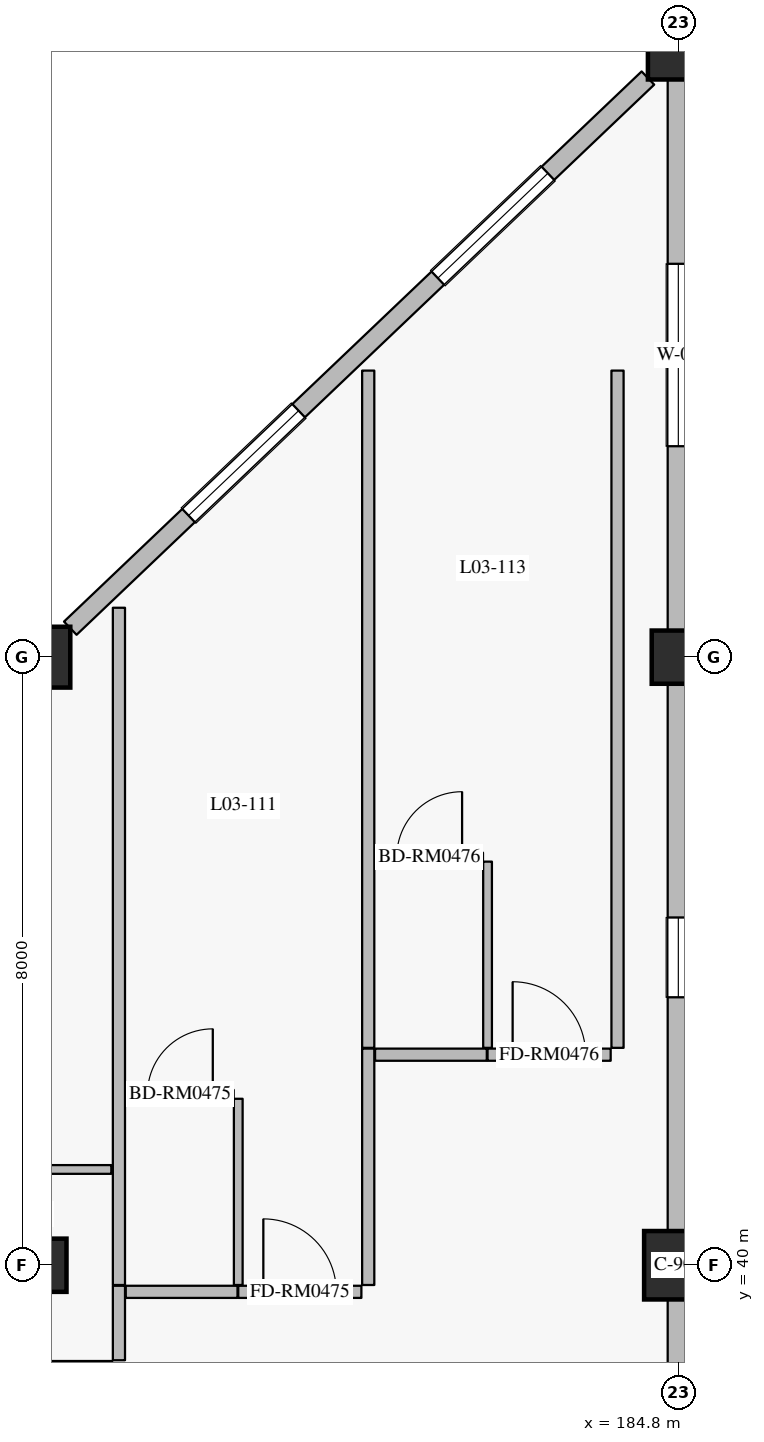
"""IFC4 building model, lengths in metres.
Left out: names, types, materials, properties, quantities, classifications, styles, units other than length and angle.
Written with IfcOpenShell. Run it as: python <this file> out.ifc"""

import sys

from ifc_helpers import new_model, si_unit, direction, frame, frame_2d, origin, origin_2d, place, context, subcontext, project, spatial, rectangle, extrude, element, fill, save


model = new_model("IFC4")
c1 = context("Model", 3, precision=1e-05, world=origin(), true_north=direction((0.0, 1.0)))
c2 = subcontext(c1, "Body", "Model", "MODEL_VIEW")
j1 = project(units=[si_unit("LENGTHUNIT", "METRE"), si_unit("PLANEANGLEUNIT", "RADIAN")], contexts=[c1])
p1 = place(None, origin())
s1 = spatial("IfcSite", under=j1, at=p1, CompositionType="ELEMENT")
p2 = place(p1, origin())
s2 = spatial("IfcBuilding", under=s1, at=p2, CompositionType="ELEMENT")
p3 = place(p2, frame((0.0, 0.0, 16.2)))
s3 = spatial("IfcBuildingStorey", under=s2, at=p3, CompositionType="ELEMENT", Elevation=16.2)
p4 = place(p3, frame((176.4, 48.0, 0.0), z_axis=(0.0, 0.0, 1.0), x_axis=(1.0, 0.0, 0.0)))
e1 = element("IfcColumn", 1, at=p4, inside=s3, PredefinedType="COLUMN", context=c2, shape_type="SweptSolid", body=[
    extrude(rectangle(XDim=0.8, YDim=0.8, at=origin_2d()), origin(), (0.0, 0.0, 1.0), 4.8),
])
p5 = place(p3, frame((184.8, 40.0, 0.0), z_axis=(0.0, 0.0, 1.0), x_axis=(1.0, 0.0, 0.0)))
e2 = element("IfcColumn", 2, at=p5, inside=s3, PredefinedType="COLUMN", context=c2, shape_type="SweptSolid", body=[
    extrude(rectangle(XDim=0.9, YDim=0.9, at=origin_2d()), origin(), (0.0, 0.0, 1.0), 4.8),
])
p6 = place(p3, frame((184.8, 56.0, 0.0), z_axis=(0.0, 0.0, 1.0), x_axis=(1.0, 0.0, 0.0)))
e3 = element("IfcColumn", 3, at=p6, inside=s3, PredefinedType="COLUMN", context=c2, shape_type="SweptSolid", body=[
    extrude(rectangle(XDim=0.8, YDim=0.8, at=origin_2d()), origin(), (0.0, 0.0, 1.0), 4.8),
])
for number, where, z_axis, x_axis in (
    (4, (176.4, 40.0, 0.0), (0.0, 0.0, 1.0), (1.0, 0.0, 0.0)),
    (5, (184.8, 48.0, 0.0), (0.0, 0.0, 1.0), (1.0, 0.0, 0.0)),
):
    element("IfcColumn", number, at=place(p3, frame(where, z_axis=z_axis, x_axis=x_axis)), inside=s3, PredefinedType="COLUMN", context=c2, shape_type="SweptSolid", body=[
        extrude(rectangle(XDim=0.7, YDim=0.7, at=origin_2d()), origin(), (0.0, 0.0, 1.0), 4.8),
    ])
p7 = place(p3, frame((176.8, 48.381, 0.0), z_axis=(0.0, 0.0, 1.0), x_axis=(0.724145676014, 0.689647040094, 0.0)))
e6 = element("IfcWall", 6, at=p7, inside=s3, PredefinedType="SOLIDWALL", context=c2, shape_type="SweptSolid", body=[
    extrude(rectangle(XDim=10.495, YDim=0.24, at=frame_2d((5.248, 0.0))), origin(), (0.0, 0.0, 1.0), 4.13),
])
p8 = place(p7, frame((2.149, 0.0, 0.8)))
e7 = element("IfcOpeningElement", 7, at=p8, cuts=e6, PredefinedType="OPENING", context=c2, shape_type="SweptSolid", body=[
    extrude(rectangle(XDim=2.0, YDim=1.75, at=frame_2d((1.0, 0.875))), frame((0.0, 0.13, 0.0), z_axis=(0.0, -1.0, 0.0), x_axis=(1.0, 0.0, 0.0)), (0.0, 0.0, 1.0), 0.26),
])
p9 = place(p7, frame((6.678, 0.0, 0.8)))
e8 = element("IfcOpeningElement", 8, at=p9, cuts=e6, PredefinedType="OPENING", context=c2, shape_type="SweptSolid", body=[
    extrude(rectangle(XDim=2.0, YDim=1.75, at=frame_2d((1.0, 0.875))), frame((0.0, 0.13, 0.0), z_axis=(0.0, -1.0, 0.0), x_axis=(1.0, 0.0, 0.0)), (0.0, 0.0, 1.0), 0.26),
])
p10 = place(p3, frame((184.8, 55.6, 0.0), z_axis=(0.0, 0.0, 1.0), x_axis=(0.0, -1.0, 0.0)))
e9 = element("IfcWall", 9, at=p10, inside=s3, PredefinedType="SOLIDWALL", context=c2, shape_type="SweptSolid", body=[
    extrude(rectangle(XDim=7.25, YDim=0.28, at=frame_2d((3.625, 0.0))), origin(), (0.0, 0.0, 1.0), 3.9),
])
p11 = place(p10, frame((2.425, 0.0, 0.75)))
e10 = element("IfcOpeningElement", 10, at=p11, cuts=e9, PredefinedType="OPENING", context=c2, shape_type="SweptSolid", body=[
    extrude(rectangle(XDim=2.4, YDim=1.65, at=frame_2d((1.2, 0.825))), frame((0.0, 0.15, 0.0), z_axis=(0.0, -1.0, 0.0), x_axis=(1.0, 0.0, 0.0)), (0.0, 0.0, 1.0), 0.3),
])
p12 = place(p3, frame((184.8, 47.65, 0.0), z_axis=(0.0, 0.0, 1.0), x_axis=(0.0, -1.0, 0.0)))
e11 = element("IfcWall", 11, at=p12, inside=s3, PredefinedType="SOLIDWALL", context=c2, shape_type="SweptSolid", body=[
    extrude(rectangle(XDim=7.2, YDim=0.28, at=frame_2d((3.6, 0.0))), origin(), (0.0, 0.0, 1.0), 3.9),
])
p13 = place(p12, frame((3.075, 0.0, 0.75)))
e12 = element("IfcOpeningElement", 12, at=p13, cuts=e11, PredefinedType="OPENING", context=c2, shape_type="SweptSolid", body=[
    extrude(rectangle(XDim=1.05, YDim=1.65, at=frame_2d((0.525, 0.825))), frame((0.0, 0.15, 0.0), z_axis=(0.0, -1.0, 0.0), x_axis=(1.0, 0.0, 0.0)), (0.0, 0.0, 1.0), 0.3),
])
p14 = place(p3, frame((184.8, 39.55, 0.0), z_axis=(0.0, 0.0, 1.0), x_axis=(0.0, -1.0, 0.0)))
e13 = element("IfcWall", 13, at=p14, inside=s3, PredefinedType="SOLIDWALL", context=c2, shape_type="SweptSolid", body=[
    extrude(rectangle(XDim=7.2, YDim=0.28, at=frame_2d((3.6, 0.0))), origin(), (0.0, 0.0, 1.0), 3.9),
])
p15 = place(p14, frame((2.4, 0.0, 0.75)))
e14 = element("IfcOpeningElement", 14, at=p15, cuts=e13, PredefinedType="OPENING", context=c2, shape_type="SweptSolid", body=[
    extrude(rectangle(XDim=2.4, YDim=1.65, at=frame_2d((1.2, 0.825))), frame((0.0, 0.15, 0.0), z_axis=(0.0, -1.0, 0.0), x_axis=(1.0, 0.0, 0.0)), (0.0, 0.0, 1.0), 0.3),
])
p16 = place(p3, frame((175.88, 38.66, 0.0), z_axis=(0.0, 0.0, 1.0), x_axis=(1.0, 0.0, 0.0)))
e15 = element("IfcWall", 15, at=p16, inside=s3, PredefinedType="PARTITIONING", context=c2, shape_type="SweptSolid", body=[
    extrude(rectangle(XDim=1.47, YDim=0.16, at=frame_2d((0.735, 0.0))), origin(), (0.0, 0.0, 1.0), 4.535),
])
p17 = place(p3, frame((175.93, 41.26, 0.0), z_axis=(0.0, 0.0, 1.0), x_axis=(1.0, 0.0, 0.0)))
e16 = element("IfcWall", 16, at=p17, inside=s3, PredefinedType="PARTITIONING", context=c2, shape_type="SweptSolid", body=[
    extrude(rectangle(XDim=1.41, YDim=0.115, at=frame_2d((0.705, 0.0))), origin(), (0.0, 0.0, 1.0), 4.535),
])
p18 = place(p3, frame((177.44, 38.75, 0.0), z_axis=(0.0, 0.0, 1.0), x_axis=(0.0, 1.0, 0.0)))
e17 = element("IfcWall", 17, at=p18, inside=s3, PredefinedType="PARTITIONING", context=c2, shape_type="SweptSolid", body=[
    extrude(rectangle(XDim=0.98, YDim=0.16, at=frame_2d((0.49, 0.0))), origin(), (0.0, 0.0, 1.0), 4.535),
])
p19 = place(p3, frame((177.53, 39.65, 0.0), z_axis=(0.0, 0.0, 1.0), x_axis=(1.0, 0.0, 0.0)))
e18 = element("IfcWall", 18, at=p19, inside=s3, PredefinedType="PARTITIONING", context=c2, shape_type="SweptSolid", body=[
    extrude(rectangle(XDim=1.47, YDim=0.16, at=frame_2d((0.735, 0.0))), origin(), (0.0, 0.0, 1.0), 4.535),
])
p20 = place(p3, frame((179.01, 39.65, 0.0), z_axis=(0.0, 0.0, 1.0), x_axis=(1.0, 0.0, 0.0)))
e19 = element("IfcWall", 19, at=p20, inside=s3, PredefinedType="PARTITIONING", context=c2, shape_type="SweptSolid", body=[
    extrude(rectangle(XDim=1.62, YDim=0.16, at=frame_2d((0.81, 0.0))), origin(), (0.0, 0.0, 1.0), 4.535),
])
p21 = place(p20, frame((0.33, 0.0, 0.0)))
e20 = element("IfcOpeningElement", 20, at=p21, cuts=e19, PredefinedType="OPENING", context=c2, shape_type="SweptSolid", body=[
    extrude(rectangle(XDim=0.96, YDim=2.2, at=frame_2d((0.48, 1.1))), frame((0.0, 0.09, 0.0), z_axis=(0.0, -1.0, 0.0), x_axis=(1.0, 0.0, 0.0)), (0.0, 0.0, 1.0), 0.18),
])
p22 = place(p3, frame((179.01, 39.74, 0.0), z_axis=(0.0, 0.0, 1.0), x_axis=(0.0, 1.0, 0.0)))
e21 = element("IfcWall", 21, at=p22, inside=s3, PredefinedType="PARTITIONING", context=c2, shape_type="SweptSolid", body=[
    extrude(rectangle(XDim=2.45, YDim=0.115, at=frame_2d((1.225, 0.0))), origin(), (0.0, 0.0, 1.0), 4.535),
])
p23 = place(p3, frame((177.54, 42.25, 0.0), z_axis=(0.0, 0.0, 1.0), x_axis=(1.0, 0.0, 0.0)))
e22 = element("IfcWall", 22, at=p23, inside=s3, PredefinedType="PARTITIONING", context=c2, shape_type="SweptSolid", body=[
    extrude(rectangle(XDim=1.41, YDim=0.115, at=frame_2d((0.705, 0.0))), origin(), (0.0, 0.0, 1.0), 4.535),
])
p24 = place(p23, frame((0.275, 0.0, 0.0)))
e23 = element("IfcOpeningElement", 23, at=p24, cuts=e22, PredefinedType="OPENING", context=c2, shape_type="SweptSolid", body=[
    extrude(rectangle(XDim=0.86, YDim=2.12, at=frame_2d((0.43, 1.06))), frame((0.0, 0.067, 0.0), z_axis=(0.0, -1.0, 0.0), x_axis=(1.0, 0.0, 0.0)), (0.0, 0.0, 1.0), 0.135),
])
p25 = place(p3, frame((177.44, 39.74, 0.0), z_axis=(0.0, 0.0, 1.0), x_axis=(0.0, 1.0, 0.0)))
e24 = element("IfcWall", 24, at=p25, inside=s3, PredefinedType="PARTITIONING", context=c2, shape_type="SweptSolid", body=[
    extrude(rectangle(XDim=8.91, YDim=0.16, at=frame_2d((4.455, 0.0))), origin(), (0.0, 0.0, 1.0), 4.535),
])
p26 = place(p3, frame((180.72, 39.74, 0.0), z_axis=(0.0, 0.0, 1.0), x_axis=(0.0, 1.0, 0.0)))
e25 = element("IfcWall", 25, at=p26, inside=s3, PredefinedType="PARTITIONING", context=c2, shape_type="SweptSolid", body=[
    extrude(rectangle(XDim=3.11, YDim=0.16, at=frame_2d((1.555, 0.0))), origin(), (0.0, 0.0, 1.0), 4.535),
])
p27 = place(p3, frame((180.81, 42.77, 0.0), z_axis=(0.0, 0.0, 1.0), x_axis=(1.0, 0.0, 0.0)))
e26 = element("IfcWall", 26, at=p27, inside=s3, PredefinedType="PARTITIONING", context=c2, shape_type="SweptSolid", body=[
    extrude(rectangle(XDim=1.47, YDim=0.16, at=frame_2d((0.735, 0.0))), origin(), (0.0, 0.0, 1.0), 4.535),
])
p28 = place(p3, frame((182.29, 42.77, 0.0), z_axis=(0.0, 0.0, 1.0), x_axis=(1.0, 0.0, 0.0)))
e27 = element("IfcWall", 27, at=p28, inside=s3, PredefinedType="PARTITIONING", context=c2, shape_type="SweptSolid", body=[
    extrude(rectangle(XDim=1.62, YDim=0.16, at=frame_2d((0.81, 0.0))), origin(), (0.0, 0.0, 1.0), 4.535),
])
p29 = place(p28, frame((0.33, 0.0, 0.0)))
e28 = element("IfcOpeningElement", 28, at=p29, cuts=e27, PredefinedType="OPENING", context=c2, shape_type="SweptSolid", body=[
    extrude(rectangle(XDim=0.96, YDim=2.2, at=frame_2d((0.48, 1.1))), frame((0.0, 0.09, 0.0), z_axis=(0.0, -1.0, 0.0), x_axis=(1.0, 0.0, 0.0)), (0.0, 0.0, 1.0), 0.18),
])
p30 = place(p3, frame((182.29, 42.86, 0.0), z_axis=(0.0, 0.0, 1.0), x_axis=(0.0, 1.0, 0.0)))
e29 = element("IfcWall", 29, at=p30, inside=s3, PredefinedType="PARTITIONING", context=c2, shape_type="SweptSolid", body=[
    extrude(rectangle(XDim=2.45, YDim=0.115, at=frame_2d((1.225, 0.0))), origin(), (0.0, 0.0, 1.0), 4.535),
])
p31 = place(p3, frame((180.82, 45.37, 0.0), z_axis=(0.0, 0.0, 1.0), x_axis=(1.0, 0.0, 0.0)))
e30 = element("IfcWall", 30, at=p31, inside=s3, PredefinedType="PARTITIONING", context=c2, shape_type="SweptSolid", body=[
    extrude(rectangle(XDim=1.41, YDim=0.115, at=frame_2d((0.705, 0.0))), origin(), (0.0, 0.0, 1.0), 4.535),
])
p32 = place(p31, frame((0.275, 0.0, 0.0)))
e31 = element("IfcOpeningElement", 31, at=p32, cuts=e30, PredefinedType="OPENING", context=c2, shape_type="SweptSolid", body=[
    extrude(rectangle(XDim=0.86, YDim=2.12, at=frame_2d((0.43, 1.06))), frame((0.0, 0.067, 0.0), z_axis=(0.0, -1.0, 0.0), x_axis=(1.0, 0.0, 0.0)), (0.0, 0.0, 1.0), 0.135),
])
for number, where, z_axis, x_axis in (
    (32, (180.72, 42.86, 0.0), (0.0, 0.0, 1.0), (0.0, 1.0, 0.0)),
    (33, (184.0, 42.86, 0.0), (0.0, 0.0, 1.0), (0.0, 1.0, 0.0)),
):
    element("IfcWall", number, at=place(p3, frame(where, z_axis=z_axis, x_axis=x_axis)), inside=s3, PredefinedType="PARTITIONING", context=c2, shape_type="SweptSolid", body=[
        extrude(rectangle(XDim=8.91, YDim=0.16, at=frame_2d((4.455, 0.0))), origin(), (0.0, 0.0, 1.0), 4.535),
    ])
p33 = place(p8, origin())
e34 = element("IfcWindow", 34, at=p33, inside=s3, PartitioningType="DOUBLE_PANEL_VERTICAL", PredefinedType="WINDOW", context=c2, shape_type="SweptSolid", body=[
    extrude(rectangle(XDim=2.0, YDim=1.75, at=frame_2d((1.0, 0.875))), frame((0.0, 0.03, 0.0), z_axis=(0.0, -1.0, 0.0), x_axis=(1.0, 0.0, 0.0)), (0.0, 0.0, 1.0), 0.06),
])
fill(e7, e34)
p34 = place(p9, origin())
e35 = element("IfcWindow", 35, at=p34, inside=s3, PartitioningType="DOUBLE_PANEL_VERTICAL", PredefinedType="WINDOW", context=c2, shape_type="SweptSolid", body=[
    extrude(rectangle(XDim=2.0, YDim=1.75, at=frame_2d((1.0, 0.875))), frame((0.0, 0.03, 0.0), z_axis=(0.0, -1.0, 0.0), x_axis=(1.0, 0.0, 0.0)), (0.0, 0.0, 1.0), 0.06),
])
fill(e8, e35)
p35 = place(p11, origin())
e36 = element("IfcWindow", 36, at=p35, inside=s3, PartitioningType="DOUBLE_PANEL_VERTICAL", PredefinedType="WINDOW", context=c2, shape_type="SweptSolid", body=[
    extrude(rectangle(XDim=2.4, YDim=1.65, at=frame_2d((1.2, 0.825))), frame((0.0, 0.03, 0.0), z_axis=(0.0, -1.0, 0.0), x_axis=(1.0, 0.0, 0.0)), (0.0, 0.0, 1.0), 0.06),
])
fill(e10, e36)
p36 = place(p13, origin())
e37 = element("IfcWindow", 37, at=p36, inside=s3, PartitioningType="SINGLE_PANEL", PredefinedType="WINDOW", context=c2, shape_type="SweptSolid", body=[
    extrude(rectangle(XDim=1.05, YDim=1.65, at=frame_2d((0.525, 0.825))), frame((0.0, 0.03, 0.0), z_axis=(0.0, -1.0, 0.0), x_axis=(1.0, 0.0, 0.0)), (0.0, 0.0, 1.0), 0.06),
])
fill(e12, e37)
p37 = place(p21, origin())
e38 = element("IfcDoor", 38, at=p37, inside=s3, OperationType="SINGLE_SWING_LEFT", PredefinedType="DOOR", context=c2, shape_type="SweptSolid", body=[
    extrude(rectangle(XDim=0.96, YDim=2.2, at=frame_2d((0.48, 1.1))), frame((0.0, 0.025, 0.0), z_axis=(0.0, -1.0, 0.0), x_axis=(1.0, 0.0, 0.0)), (0.0, 0.0, 1.0), 0.05),
])
fill(e20, e38)
p38 = place(p24, origin())
e39 = element("IfcDoor", 39, at=p38, inside=s3, OperationType="SINGLE_SWING_RIGHT", PredefinedType="DOOR", context=c2, shape_type="SweptSolid", body=[
    extrude(rectangle(XDim=0.86, YDim=2.12, at=frame_2d((0.43, 1.06))), frame((0.0, 0.025, 0.0), z_axis=(0.0, -1.0, 0.0), x_axis=(1.0, 0.0, 0.0)), (0.0, 0.0, 1.0), 0.05),
])
fill(e23, e39)
p39 = place(p29, origin())
e40 = element("IfcDoor", 40, at=p39, inside=s3, OperationType="SINGLE_SWING_LEFT", PredefinedType="DOOR", context=c2, shape_type="SweptSolid", body=[
    extrude(rectangle(XDim=0.96, YDim=2.2, at=frame_2d((0.48, 1.1))), frame((0.0, 0.025, 0.0), z_axis=(0.0, -1.0, 0.0), x_axis=(1.0, 0.0, 0.0)), (0.0, 0.0, 1.0), 0.05),
])
fill(e28, e40)
p40 = place(p32, origin())
e41 = element("IfcDoor", 41, at=p40, inside=s3, OperationType="SINGLE_SWING_RIGHT", PredefinedType="DOOR", context=c2, shape_type="SweptSolid", body=[
    extrude(rectangle(XDim=0.86, YDim=2.12, at=frame_2d((0.43, 1.06))), frame((0.0, 0.025, 0.0), z_axis=(0.0, -1.0, 0.0), x_axis=(1.0, 0.0, 0.0)), (0.0, 0.0, 1.0), 0.05),
])
fill(e31, e41)
save(model, sys.argv[1])
